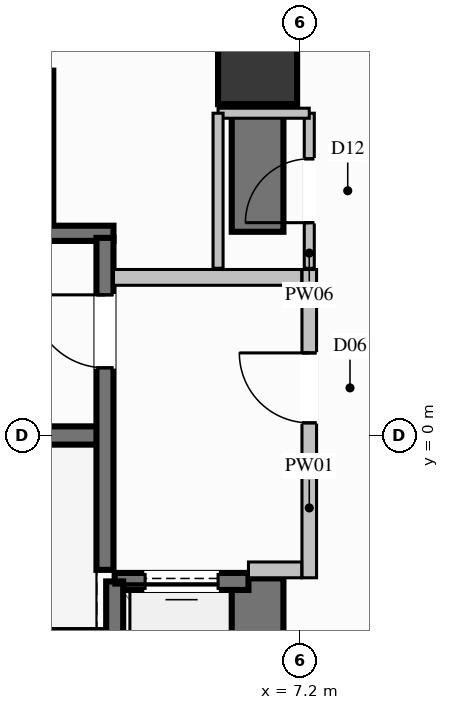
"""IFC4 building model, lengths in metres.
Left out: names, types, materials, properties, quantities, classifications, styles, units other than length and angle.
Written with IfcOpenShell. Run it as: python <this file> out.ifc"""

import sys

from ifc_helpers import new_model, si_unit, direction, frame, frame_2d, origin, origin_2d, place, context, subcontext, project, spatial, rectangle, extrude, element, fill, save


model = new_model("IFC4")
c1 = context("Model", 3, precision=1e-05, world=origin(), true_north=direction((0.0, 1.0)))
c2 = subcontext(c1, "Body", "Model", "MODEL_VIEW")
j1 = project(units=[si_unit("LENGTHUNIT", "METRE"), si_unit("PLANEANGLEUNIT", "RADIAN")], contexts=[c1])
p1 = place(None, origin())
s1 = spatial("IfcSite", under=j1, at=p1, CompositionType="ELEMENT")
p2 = place(p1, origin())
s2 = spatial("IfcBuilding", under=s1, at=p2, CompositionType="ELEMENT")
p3 = place(p2, frame((0.0, 0.0, 7.2)))
s3 = spatial("IfcBuildingStorey", under=s2, at=p3, CompositionType="ELEMENT", Elevation=7.2)
p4 = place(p3, frame((6.5, 6.1, 0.0), z_axis=(0.0, 0.0, 1.0), x_axis=(1.0, 0.0, 0.0)))
e1 = element("IfcColumn", 1, at=p4, inside=s3, PredefinedType="COLUMN", context=c2, shape_type="SweptSolid", body=[
    extrude(rectangle(XDim=1.3, YDim=1.3, at=origin_2d()), origin(), (0.0, 0.0, 1.0), 5.4),
])
p5 = place(p3, frame((-3.99, 0.0, 0.0), z_axis=(0.0, 0.0, 1.0), x_axis=(1.0, 0.0, 0.0)))
e2 = element("IfcWall", 2, at=p5, inside=s3, PredefinedType="SHEAR", context=c2, shape_type="SweptSolid", body=[
    extrude(rectangle(XDim=7.98, YDim=0.3, at=frame_2d((3.99, 0.0))), origin(), (0.0, 0.0, 1.0), 5.4),
])
for number, where, z_axis, x_axis in (
    (3, (-4.13, -3.325, 0.0), (0.0, 0.0, 1.0), (1.0, 0.0, 0.0)),
    (4, (-4.13, 3.325, 0.0), (0.0, 0.0, 1.0), (1.0, 0.0, 0.0)),
):
    element("IfcWall", number, at=place(p3, frame(where, z_axis=z_axis, x_axis=x_axis)), inside=s3, PredefinedType="SOLIDWALL", context=c2, shape_type="SweptSolid", body=[
        extrude(rectangle(XDim=8.26, YDim=0.25, at=frame_2d((4.13, 0.0))), origin(), (0.0, 0.0, 1.0), 5.4),
    ])
p6 = place(p3, frame((5.85, 6.1, 0.0), z_axis=(0.0, 0.0, 1.0), x_axis=(1.0, 0.0, 0.0)))
e5 = element("IfcWall", 5, at=p6, inside=s3, PredefinedType="SHEAR", context=c2, shape_type="SweptSolid", body=[
    extrude(rectangle(XDim=0.225, YDim=0.85, at=frame_2d((0.112, 0.0))), origin(), (0.0, 0.0, 1.0), 5.4),
])
p7 = place(p3, frame((6.5, -6.525, 0.0), z_axis=(0.0, 0.0, 1.0), x_axis=(0.0, 1.0, 0.0)))
e6 = element("IfcWall", 6, at=p7, inside=s3, PredefinedType="SHEAR", context=c2, shape_type="SweptSolid", body=[
    extrude(rectangle(XDim=4.175, YDim=0.85, at=frame_2d((2.087, 0.0))), origin(), (0.0, 0.0, 1.0), 5.4),
])
p8 = place(p3, frame((6.5, 3.35, 0.0), z_axis=(0.0, 0.0, 1.0), x_axis=(0.0, 1.0, 0.0)))
e7 = element("IfcWall", 7, at=p8, inside=s3, PredefinedType="SHEAR", context=c2, shape_type="SweptSolid", body=[
    extrude(rectangle(XDim=3.175, YDim=0.85, at=frame_2d((1.587, 0.0))), origin(), (0.0, 0.0, 1.0), 5.4),
])
p9 = place(p3, frame((3.0, 3.5, 0.0), z_axis=(0.0, 0.0, 1.0), x_axis=(0.0, 1.0, 0.0)))
e8 = element("IfcWall", 8, at=p9, inside=s3, PredefinedType="SOLIDWALL", context=c2, shape_type="SweptSolid", body=[
    extrude(rectangle(XDim=2.5, YDim=0.28, at=frame_2d((1.25, 0.0))), origin(), (0.0, 0.0, 1.0), 4.98),
])
p10 = place(p3, frame((6.35, -2.4, 0.0), z_axis=(0.0, 0.0, 1.0), x_axis=(-1.0, 0.0, 0.0)))
e9 = element("IfcWall", 9, at=p10, inside=s3, PredefinedType="SOLIDWALL", context=c2, shape_type="SweptSolid", body=[
    extrude(rectangle(XDim=2.2, YDim=0.28, at=frame_2d((1.1, 0.0))), origin(), (0.0, 0.0, 1.0), 4.98),
])
p11 = place(p10, frame((0.5, 0.0, 0.0)))
e10 = element("IfcOpeningElement", 10, at=p11, cuts=e9, PredefinedType="OPENING", context=c2, shape_type="SweptSolid", body=[
    extrude(rectangle(XDim=1.2, YDim=2.2, at=frame_2d((0.6, 1.1))), frame((0.0, 0.15, 0.0), z_axis=(0.0, -1.0, 0.0), x_axis=(1.0, 0.0, 0.0)), (0.0, 0.0, 1.0), 0.3),
])
p12 = place(p3, frame((4.15, -2.4, 0.0), z_axis=(0.0, 0.0, 1.0), x_axis=(0.0, -1.0, 0.0)))
e11 = element("IfcWall", 11, at=p12, inside=s3, PredefinedType="SOLIDWALL", context=c2, shape_type="SweptSolid", body=[
    extrude(rectangle(XDim=2.7, YDim=0.28, at=frame_2d((1.35, 0.0))), origin(), (0.0, 0.0, 1.0), 4.98),
])
p13 = place(p3, frame((3.99, -2.21, 0.0), z_axis=(0.0, 0.0, 1.0), x_axis=(0.0, 1.0, 0.0)))
e12 = element("IfcWall", 12, at=p13, inside=s3, PredefinedType="SOLIDWALL", context=c2, shape_type="SweptSolid", body=[
    extrude(rectangle(XDim=5.46, YDim=0.28, at=frame_2d((2.73, 0.0))), origin(), (0.0, 0.0, 1.0), 4.98),
])
p14 = place(p13, frame((3.323, 0.0, 0.0)))
e13 = element("IfcOpeningElement", 13, at=p14, cuts=e12, PredefinedType="OPENING", context=c2, shape_type="SweptSolid", body=[
    extrude(rectangle(XDim=1.2, YDim=2.2, at=frame_2d((0.6, 1.1))), frame((0.0, 0.15, 0.0), z_axis=(0.0, -1.0, 0.0), x_axis=(1.0, 0.0, 0.0)), (0.0, 0.0, 1.0), 0.3),
])
p15 = place(p3, frame((7.35, -2.34, 0.0), z_axis=(0.0, 0.0, 1.0), x_axis=(0.0, 1.0, 0.0)))
e14 = element("IfcWall", 14, at=p15, inside=s3, PredefinedType="PARTITIONING", context=c2, shape_type="SweptSolid", body=[
    extrude(rectangle(XDim=5.07, YDim=0.24, at=frame_2d((2.535, 0.0))), origin(), (0.0, 0.0, 1.0), 3.865),
])
p16 = place(p15, frame((2.548, 0.0, 0.0)))
e15 = element("IfcOpeningElement", 15, at=p16, cuts=e14, PredefinedType="OPENING", context=c2, shape_type="SweptSolid", body=[
    extrude(rectangle(XDim=1.15, YDim=2.2, at=frame_2d((0.575, 1.1))), frame((0.0, 0.13, 0.0), z_axis=(0.0, -1.0, 0.0), x_axis=(1.0, 0.0, 0.0)), (0.0, 0.0, 1.0), 0.26),
])
p17 = place(p3, frame((6.35, -2.21, 0.0), z_axis=(0.0, 0.0, 1.0), x_axis=(1.0, 0.0, 0.0)))
e16 = element("IfcWall", 16, at=p17, inside=s3, PredefinedType="PARTITIONING", context=c2, shape_type="SweptSolid", body=[
    extrude(rectangle(XDim=0.875, YDim=0.26, at=frame_2d((0.438, 0.0))), origin(), (0.0, 0.0, 1.0), 4.98),
])
p18 = place(p3, frame((4.13, 2.6, 0.0), z_axis=(0.0, 0.0, 1.0), x_axis=(1.0, 0.0, 0.0)))
e17 = element("IfcWall", 17, at=p18, inside=s3, PredefinedType="PARTITIONING", context=c2, shape_type="SweptSolid", body=[
    extrude(rectangle(XDim=3.095, YDim=0.26, at=frame_2d((1.548, 0.0))), origin(), (0.0, 0.0, 1.0), 4.98),
])
p19 = place(p3, frame((7.35, 2.75, 0.0), z_axis=(0.0, 0.0, 1.0), x_axis=(0.0, 1.0, 0.0)))
e18 = element("IfcWall", 18, at=p19, inside=s3, PredefinedType="PARTITIONING", context=c2, shape_type="SweptSolid", body=[
    extrude(rectangle(XDim=2.55, YDim=0.165, at=frame_2d((1.275, 0.0))), origin(), (0.0, 0.0, 1.0), 3.865),
])
p20 = place(p19, frame((0.75, 0.0, 0.0)))
e19 = element("IfcOpeningElement", 19, at=p20, cuts=e18, PredefinedType="OPENING", context=c2, shape_type="SweptSolid", body=[
    extrude(rectangle(XDim=1.05, YDim=2.15, at=frame_2d((0.525, 1.075))), frame((0.0, 0.093, 0.0), z_axis=(0.0, -1.0, 0.0), x_axis=(1.0, 0.0, 0.0)), (0.0, 0.0, 1.0), 0.185),
])
p21 = place(p3, frame((7.35, 5.3, 0.0), z_axis=(0.0, 0.0, 1.0), x_axis=(-1.0, 0.0, 0.0)))
e20 = element("IfcWall", 20, at=p21, inside=s3, PredefinedType="PARTITIONING", context=c2, shape_type="SweptSolid", body=[
    extrude(rectangle(XDim=1.5, YDim=0.165, at=frame_2d((0.75, 0.0))), origin(), (0.0, 0.0, 1.0), 3.865),
])
p22 = place(p3, frame((5.85, 5.3, 0.0), z_axis=(0.0, 0.0, 1.0), x_axis=(0.0, -1.0, 0.0)))
e21 = element("IfcWall", 21, at=p22, inside=s3, PredefinedType="PARTITIONING", context=c2, shape_type="SweptSolid", body=[
    extrude(rectangle(XDim=2.55, YDim=0.165, at=frame_2d((1.275, 0.0))), origin(), (0.0, 0.0, 1.0), 3.865),
])
p23 = place(p11, origin())
e22 = element("IfcDoor", 22, at=p23, inside=s3, OperationType="SLIDING_TO_LEFT", PredefinedType="DOOR", context=c2, shape_type="SweptSolid", body=[
    extrude(rectangle(XDim=1.2, YDim=2.2, at=frame_2d((0.6, 1.1))), frame((0.0, 0.025, 0.0), z_axis=(0.0, -1.0, 0.0), x_axis=(1.0, 0.0, 0.0)), (0.0, 0.0, 1.0), 0.05),
])
fill(e10, e22)
p24 = place(p14, origin())
e23 = element("IfcDoor", 23, at=p24, inside=s3, OperationType="SINGLE_SWING_RIGHT", PredefinedType="DOOR", context=c2, shape_type="SweptSolid", body=[
    extrude(rectangle(XDim=1.2, YDim=2.2, at=frame_2d((0.6, 1.1))), frame((0.0, 0.025, 0.0), z_axis=(0.0, -1.0, 0.0), x_axis=(1.0, 0.0, 0.0)), (0.0, 0.0, 1.0), 0.05),
])
fill(e13, e23)
p25 = place(p16, origin())
e24 = element("IfcDoor", 24, at=p25, inside=s3, OperationType="SINGLE_SWING_RIGHT", PredefinedType="DOOR", context=c2, shape_type="SweptSolid", body=[
    extrude(rectangle(XDim=1.15, YDim=2.2, at=frame_2d((0.575, 1.1))), frame((0.0, 0.025, 0.0), z_axis=(0.0, -1.0, 0.0), x_axis=(1.0, 0.0, 0.0)), (0.0, 0.0, 1.0), 0.05),
])
fill(e15, e24)
p26 = place(p20, origin())
e25 = element("IfcDoor", 25, at=p26, inside=s3, OperationType="SINGLE_SWING_LEFT", PredefinedType="DOOR", context=c2, shape_type="SweptSolid", body=[
    extrude(rectangle(XDim=1.05, YDim=2.15, at=frame_2d((0.525, 1.075))), frame((0.0, 0.025, 0.0), z_axis=(0.0, -1.0, 0.0), x_axis=(1.0, 0.0, 0.0)), (0.0, 0.0, 1.0), 0.05),
])
fill(e19, e25)
save(model, sys.argv[1])
